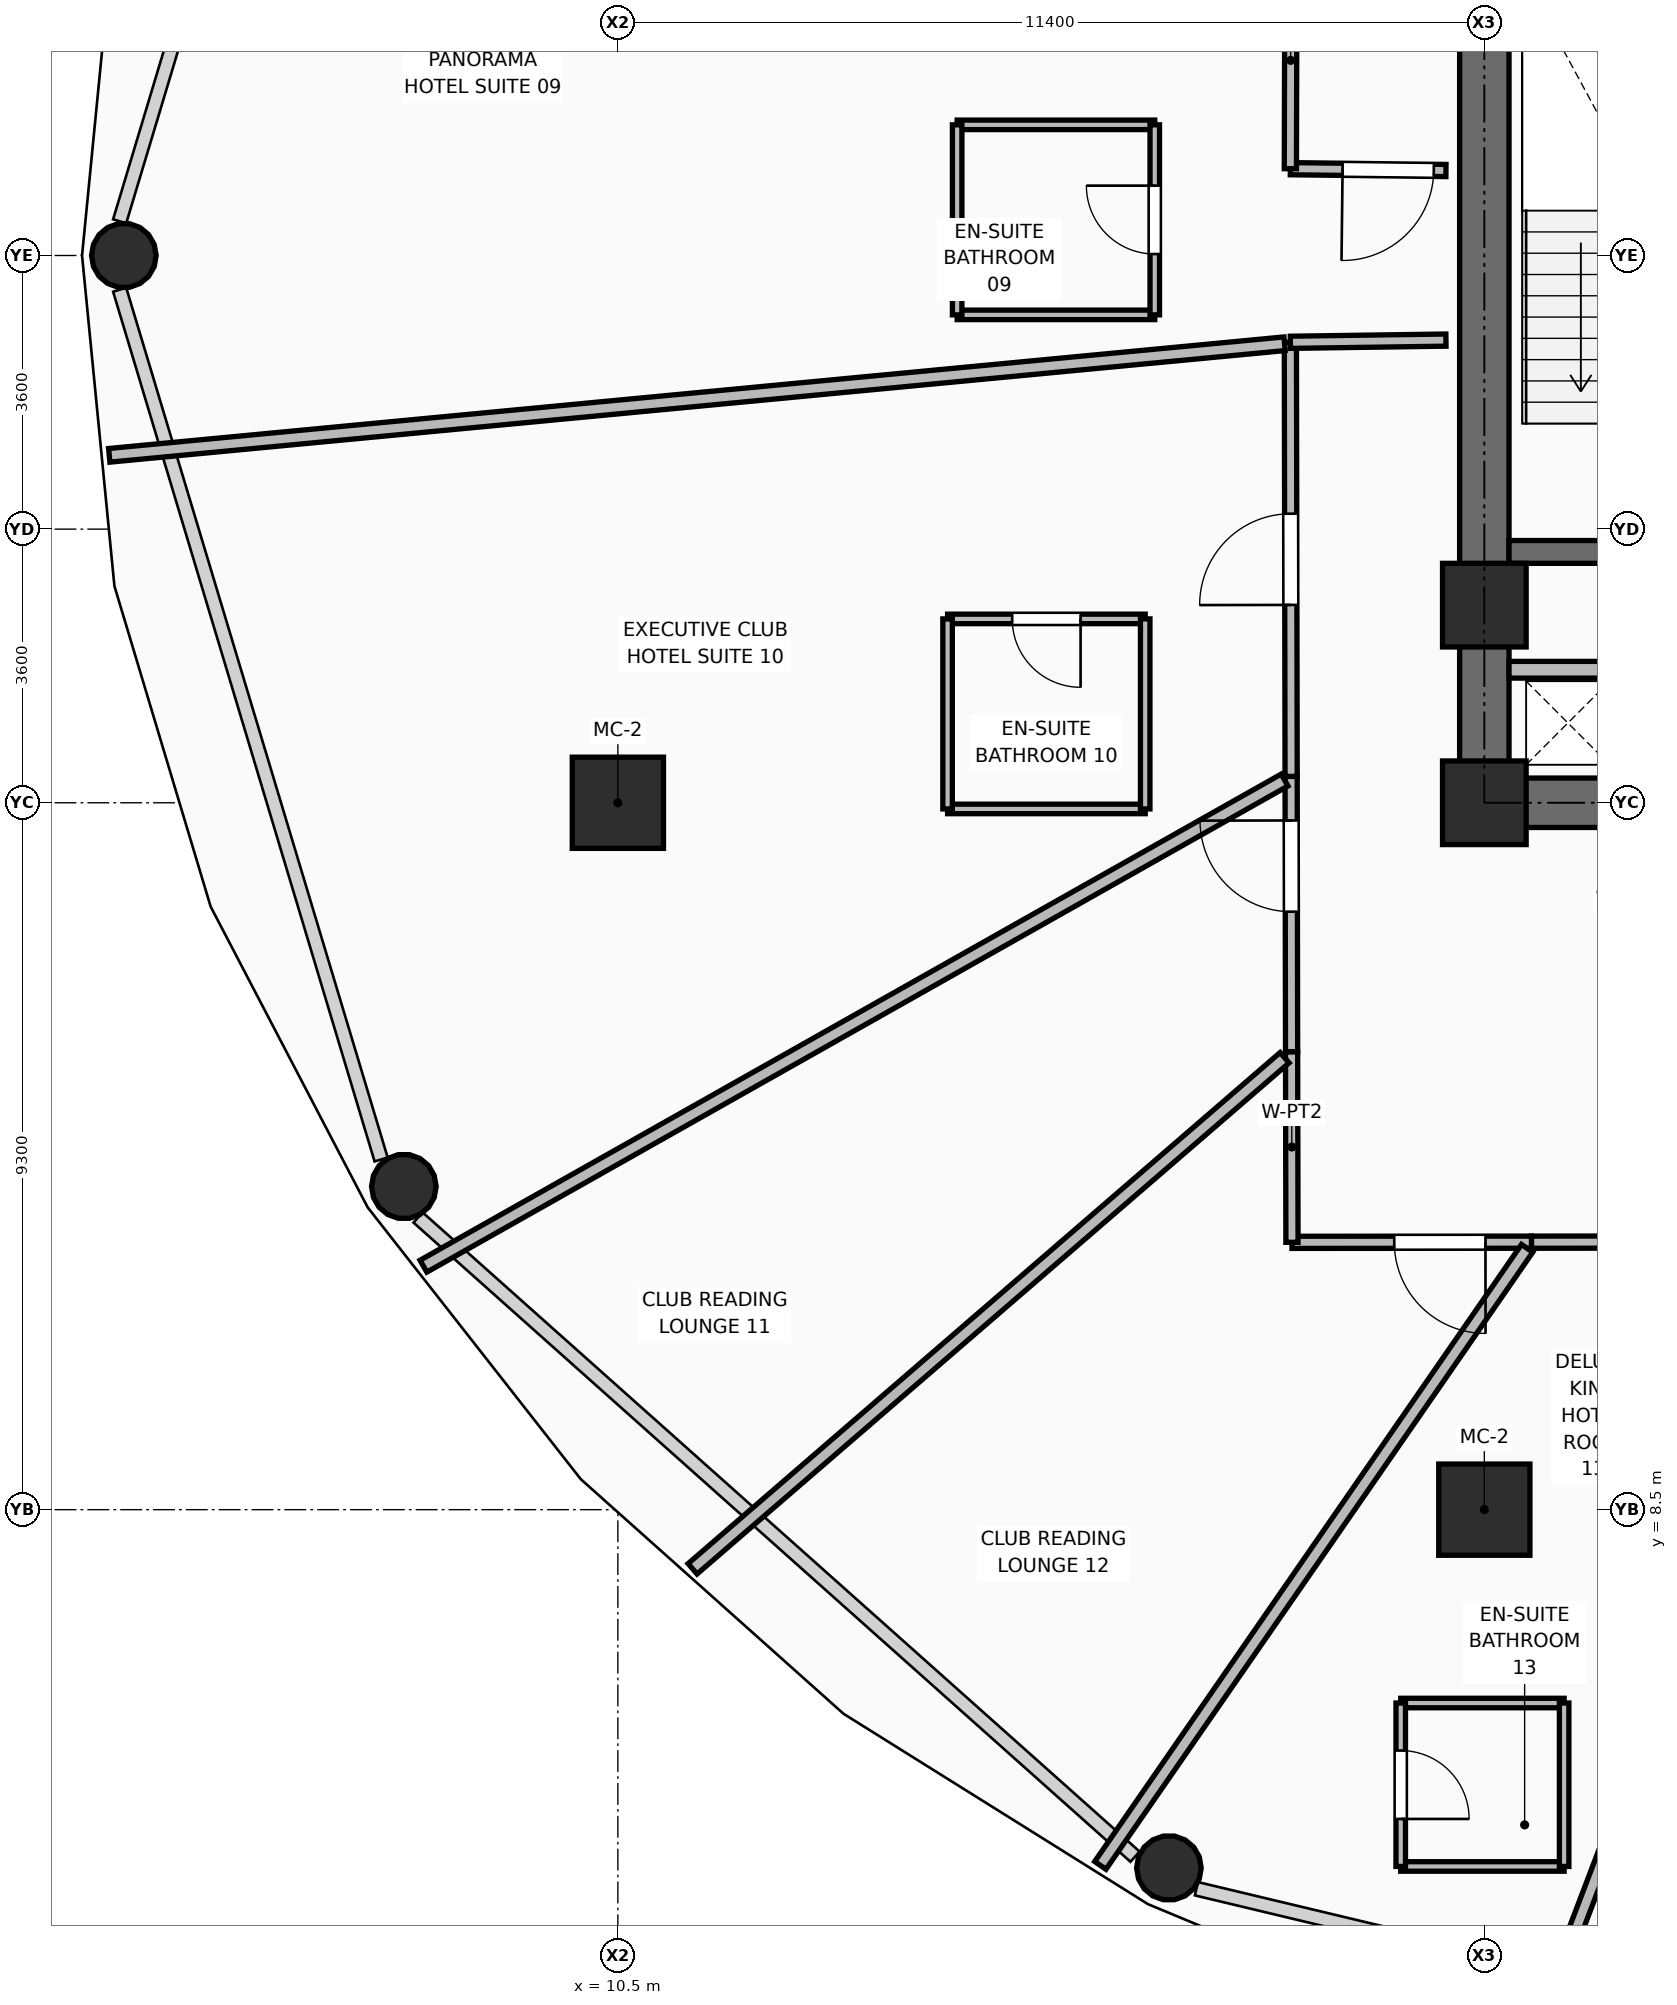
"""IFC4 building model, lengths in metres.
Left out: names, types, materials, properties, quantities, classifications, styles, units other than length and angle.
Written with IfcOpenShell. Run it as: python <this file> out.ifc"""

import sys

from ifc_helpers import new_model, si_unit, direction, frame, frame_2d, origin, origin_2d, place, context, subcontext, project, spatial, rectangle, hollow_rectangle, hollow_circle, extrude, element, fill, save


model = new_model("IFC4")
c1 = context("Model", 3, precision=1e-05, world=origin(), true_north=direction((0.0, 1.0)))
c2 = subcontext(c1, "Body", "Model", "MODEL_VIEW")
j1 = project(units=[si_unit("LENGTHUNIT", "METRE"), si_unit("PLANEANGLEUNIT", "RADIAN")], contexts=[c1])
p1 = place(None, origin())
s1 = spatial("IfcSite", under=j1, at=p1, CompositionType="ELEMENT")
p2 = place(p1, origin())
s2 = spatial("IfcBuilding", under=s1, at=p2, CompositionType="ELEMENT")
p3 = place(p2, frame((0.0, 0.0, 83.25)))
s3 = spatial("IfcBuildingStorey", under=s2, at=p3, CompositionType="ELEMENT", Elevation=83.25)
for number, where, z_axis, x_axis in (
    (1, (21.9, 17.8, 0.0), (0.0, 0.0, 1.0), (1.0, 0.0, 0.0)),
    (2, (21.9, 20.4, 0.0), (0.0, 0.0, 1.0), (1.0, 0.0, 0.0)),
):
    element("IfcColumn", number, at=place(p3, frame(where, z_axis=z_axis, x_axis=x_axis)), inside=s3, PredefinedType="COLUMN", context=c2, shape_type="SweptSolid", body=[
        extrude(rectangle(XDim=1.1, YDim=1.1, at=origin_2d()), origin(), (0.0, 0.0, 1.0), 3.75),
    ])
for number, where, z_axis, x_axis in (
    (3, (21.9, 8.5, 0.0), (0.0, 0.0, 1.0), (1.0, 0.0, 0.0)),
    (4, (10.5, 17.8, 0.0), (0.0, 0.0, 1.0), (1.0, 0.0, 0.0)),
):
    element("IfcColumn", number, at=place(p3, frame(where, z_axis=z_axis, x_axis=x_axis)), inside=s3, PredefinedType="COLUMN", context=c2, shape_type="SweptSolid", body=[
        extrude(hollow_rectangle(XDim=1.2, YDim=1.2, WallThickness=0.045, at=origin_2d()), origin(), (0.0, 0.0, 1.0), 3.75),
    ])
for number, where, z_axis, x_axis in (
    (5, (4.0, 25.0, 0.0), (0.0, 0.0, 1.0), (1.0, 0.0, 0.0)),
    (6, (7.684, 12.752, 0.0), (0.0, 0.0, 1.0), (1.0, 0.0, 0.0)),
    (7, (17.75, 3.787, 0.0), (0.0, 0.0, 1.0), (1.0, 0.0, 0.0)),
):
    element("IfcColumn", number, at=place(p3, frame(where, z_axis=z_axis, x_axis=x_axis)), inside=s3, PredefinedType="COLUMN", context=c2, shape_type="SweptSolid", body=[
        extrude(hollow_circle(Radius=0.425, WallThickness=0.04, at=origin_2d()), origin(), (0.0, 0.0, 1.0), 3.57),
    ])
p4 = place(p3, frame((21.575, 17.8, 0.0), z_axis=(0.0, 0.0, 1.0), x_axis=(1.0, 0.0, 0.0)))
e8 = element("IfcWall", 8, at=p4, inside=s3, PredefinedType="SHEAR", context=c2, shape_type="SweptSolid", body=[
    extrude(rectangle(XDim=2.175, YDim=0.65, at=frame_2d((1.087, 0.0))), origin(), (0.0, 0.0, 1.0), 3.57),
])
p5 = place(p3, frame((21.9, 18.125, 0.0), z_axis=(0.0, 0.0, 1.0), x_axis=(0.0, 1.0, 0.0)))
e9 = element("IfcWall", 9, at=p5, inside=s3, PredefinedType="SHEAR", context=c2, shape_type="SweptSolid", body=[
    extrude(rectangle(XDim=14.0, YDim=0.65, at=frame_2d((7.0, 0.0))), origin(), (0.0, 0.0, 1.0), 3.57),
])
p6 = place(p3, frame((22.225, 21.1, 0.0), z_axis=(0.0, 0.0, 1.0), x_axis=(1.0, 0.0, 0.0)))
e10 = element("IfcWall", 10, at=p6, inside=s3, PredefinedType="SHEAR", context=c2, shape_type="SweptSolid", body=[
    extrude(rectangle(XDim=3.515, YDim=0.3, at=frame_2d((1.757, 0.0))), origin(), (0.0, 0.0, 1.0), 3.57),
])
p7 = place(p6, frame((1.995, 0.0, 0.0)))
e11 = element("IfcOpeningElement", 11, at=p7, cuts=e10, PredefinedType="OPENING", context=c2, shape_type="SweptSolid", body=[
    extrude(rectangle(XDim=1.05, YDim=2.1, at=frame_2d((0.525, 1.05))), frame((0.0, 0.16, 0.0), z_axis=(0.0, -1.0, 0.0), x_axis=(1.0, 0.0, 0.0)), (0.0, 0.0, 1.0), 0.32),
])
p8 = place(p3, frame((22.225, 19.55, 0.0), z_axis=(0.0, 0.0, 1.0), x_axis=(1.0, 0.0, 0.0)))
e12 = element("IfcWall", 12, at=p8, inside=s3, PredefinedType="PARTITIONING", context=c2, shape_type="SweptSolid", body=[
    extrude(rectangle(XDim=1.565, YDim=0.22, at=frame_2d((0.782, 0.0))), origin(), (0.0, 0.0, 1.0), 2.595),
])
p9 = place(p3, frame((21.395, 26.118, 0.0), z_axis=(0.0, 0.0, 1.0), x_axis=(-0.999930307049, 0.011805975003, 0.0)))
e13 = element("IfcWall", 13, at=p9, inside=s3, PredefinedType="PARTITIONING", context=c2, shape_type="SweptSolid", body=[
    extrude(rectangle(XDim=2.047, YDim=0.16, at=frame_2d((1.024, 0.0))), origin(), (0.0, 0.0, 1.0), 3.55),
])
p10 = place(p9, frame((0.16, 0.0, 0.0)))
e14 = element("IfcOpeningElement", 14, at=p10, cuts=e13, PredefinedType="OPENING", context=c2, shape_type="SweptSolid", body=[
    extrude(rectangle(XDim=1.2, YDim=2.1, at=frame_2d((0.6, 1.05))), frame((0.0, 0.09, 0.0), z_axis=(0.0, -1.0, 0.0), x_axis=(1.0, 0.0, 0.0)), (0.0, 0.0, 1.0), 0.18),
])
p11 = place(p3, frame((19.348, 26.142, 0.0), z_axis=(0.0, 0.0, 1.0), x_axis=(0.002483506942, 0.999996916092, 0.0)))
e15 = element("IfcWall", 15, at=p11, inside=s3, PredefinedType="PARTITIONING", context=c2, shape_type="SweptSolid", body=[
    extrude(rectangle(XDim=2.851, YDim=0.16, at=frame_2d((1.425, 0.0))), origin(), (0.0, 0.0, 1.0), 3.55),
])
p12 = place(p3, frame((26.552, 12.022, 0.0), z_axis=(0.0, 0.0, 1.0), x_axis=(-0.999999736017, -0.000726611979, 0.0)))
e16 = element("IfcWall", 16, at=p12, inside=s3, PredefinedType="PARTITIONING", context=c2, shape_type="SweptSolid", body=[
    extrude(rectangle(XDim=4.032, YDim=0.16, at=frame_2d((2.016, 0.0))), origin(), (0.0, 0.0, 1.0), 3.55),
])
p13 = place(p12, frame((1.587, 0.0, 0.0)))
e17 = element("IfcOpeningElement", 17, at=p13, cuts=e16, PredefinedType="OPENING", context=c2, shape_type="SweptSolid", body=[
    extrude(rectangle(XDim=1.0, YDim=2.1, at=frame_2d((0.5, 1.05))), frame((0.0, 0.09, 0.0), z_axis=(0.0, -1.0, 0.0), x_axis=(1.0, 0.0, 0.0)), (0.0, 0.0, 1.0), 0.18),
])
p14 = place(p3, frame((22.52, 12.019, 0.0), z_axis=(0.0, 0.0, 1.0), x_axis=(-0.999999807912, -0.000619818584, 0.0)))
e18 = element("IfcWall", 18, at=p14, inside=s3, PredefinedType="PARTITIONING", context=c2, shape_type="SweptSolid", body=[
    extrude(rectangle(XDim=3.151, YDim=0.16, at=frame_2d((1.576, 0.0))), origin(), (0.0, 0.0, 1.0), 2.928),
])
p15 = place(p14, frame((0.605, 0.0, 0.0)))
e19 = element("IfcOpeningElement", 19, at=p15, cuts=e18, PredefinedType="OPENING", context=c2, shape_type="SweptSolid", body=[
    extrude(rectangle(XDim=1.2, YDim=2.1, at=frame_2d((0.6, 1.05))), frame((0.0, 0.09, 0.0), z_axis=(0.0, -1.0, 0.0), x_axis=(1.0, 0.0, 0.0)), (0.0, 0.0, 1.0), 0.18),
])
p16 = place(p3, frame((19.369, 12.017, 0.0), z_axis=(0.0, 0.0, 1.0), x_axis=(-0.001947036808, 0.999998104522, 0.0)))
e20 = element("IfcWall", 20, at=p16, inside=s3, PredefinedType="PARTITIONING", context=c2, shape_type="SweptSolid", body=[
    extrude(rectangle(XDim=2.508, YDim=0.16, at=frame_2d((1.254, 0.0))), origin(), (0.0, 0.0, 1.0), 3.55),
])
p17 = place(p3, frame((19.364, 14.525, 0.0), z_axis=(0.0, 0.0, 1.0), x_axis=(-0.001685087928, 0.999998580238, 0.0)))
e21 = element("IfcWall", 21, at=p17, inside=s3, PredefinedType="PARTITIONING", context=c2, shape_type="SweptSolid", body=[
    extrude(rectangle(XDim=3.622, YDim=0.16, at=frame_2d((1.811, 0.0))), origin(), (0.0, 0.0, 1.0), 2.928),
])
p18 = place(p17, frame((1.842, 0.0, 0.0)))
e22 = element("IfcOpeningElement", 22, at=p18, cuts=e21, PredefinedType="OPENING", context=c2, shape_type="SweptSolid", body=[
    extrude(rectangle(XDim=1.2, YDim=2.1, at=frame_2d((0.6, 1.05))), frame((0.0, 0.09, 0.0), z_axis=(0.0, -1.0, 0.0), x_axis=(1.0, 0.0, 0.0)), (0.0, 0.0, 1.0), 0.18),
])
p19 = place(p3, frame((19.358, 18.147, 0.0), z_axis=(0.0, 0.0, 1.0), x_axis=(-0.001752733286, 0.999998463962, 0.0)))
e23 = element("IfcWall", 23, at=p19, inside=s3, PredefinedType="PARTITIONING", context=c2, shape_type="SweptSolid", body=[
    extrude(rectangle(XDim=5.711, YDim=0.16, at=frame_2d((2.855, 0.0))), origin(), (0.0, 0.0, 1.0), 2.928),
])
p20 = place(p19, frame((2.256, 0.0, 0.0)))
e24 = element("IfcOpeningElement", 24, at=p20, cuts=e23, PredefinedType="OPENING", context=c2, shape_type="SweptSolid", body=[
    extrude(rectangle(XDim=1.2, YDim=2.1, at=frame_2d((0.6, 1.05))), frame((0.0, 0.09, 0.0), z_axis=(0.0, -1.0, 0.0), x_axis=(1.0, 0.0, 0.0)), (0.0, 0.0, 1.0), 0.18),
])
p21 = place(p3, frame((19.348, 23.858, 0.0), z_axis=(0.0, 0.0, 1.0), x_axis=(0.999899308643, 0.014190580528, 0.0)))
e25 = element("IfcWall", 25, at=p21, inside=s3, PredefinedType="PARTITIONING", context=c2, shape_type="SweptSolid", body=[
    extrude(rectangle(XDim=2.047, YDim=0.16, at=frame_2d((1.024, 0.0))), origin(), (0.0, 0.0, 1.0), 3.55),
])
p22 = place(p3, frame((19.272, 23.839, 0.0), z_axis=(0.0, 0.0, 1.0), x_axis=(-0.995524176843, -0.094507213062, 0.0)))
e26 = element("IfcWall", 26, at=p22, inside=s3, PredefinedType="PARTITIONING", context=c2, shape_type="SweptSolid", body=[
    extrude(rectangle(XDim=15.533, YDim=0.18, at=frame_2d((7.767, 0.0))), origin(), (0.0, 0.0, 1.0), 2.775),
])
p23 = place(p3, frame((19.272, 18.099, 0.0), z_axis=(0.0, 0.0, 1.0), x_axis=(-0.870816794363, -0.491607679614, 0.0)))
e27 = element("IfcWall", 27, at=p23, inside=s3, PredefinedType="PARTITIONING", context=c2, shape_type="SweptSolid", body=[
    extrude(rectangle(XDim=13.011, YDim=0.18, at=frame_2d((6.505, 0.0))), origin(), (0.0, 0.0, 1.0), 2.775),
])
p24 = place(p3, frame((19.272, 14.446, 0.0), z_axis=(0.0, 0.0, 1.0), x_axis=(-0.756957430289, -0.653464190855, 0.0)))
e28 = element("IfcWall", 28, at=p24, inside=s3, PredefinedType="PARTITIONING", context=c2, shape_type="SweptSolid", body=[
    extrude(rectangle(XDim=10.29, YDim=0.18, at=frame_2d((5.145, 0.0))), origin(), (0.0, 0.0, 1.0), 2.775),
])
p25 = place(p3, frame((22.463, 11.938, 0.0), z_axis=(0.0, 0.0, 1.0), x_axis=(-0.568860087872, -0.822434313746, 0.0)))
e29 = element("IfcWall", 29, at=p25, inside=s3, PredefinedType="PARTITIONING", context=c2, shape_type="SweptSolid", body=[
    extrude(rectangle(XDim=9.871, YDim=0.18, at=frame_2d((4.935, 0.0))), origin(), (0.0, 0.0, 1.0), 2.775),
])
p26 = place(p3, frame((26.52, 11.938, 0.0), z_axis=(0.0, 0.0, 1.0), x_axis=(-0.356180272112, -0.934417258915, 0.0)))
e30 = element("IfcWall", 30, at=p26, inside=s3, PredefinedType="PARTITIONING", context=c2, shape_type="SweptSolid", body=[
    extrude(rectangle(XDim=11.253, YDim=0.18, at=frame_2d((5.626, 0.0))), origin(), (0.0, 0.0, 1.0), 2.775),
])
for number, where, z_axis, x_axis in (
    (31, (14.964, 24.219, 0.0), (0.0, 0.0, 1.0), (1.0, 0.0, 0.0)),
    (32, (14.964, 26.719, 0.0), (0.0, 0.0, 1.0), (1.0, 0.0, 0.0)),
):
    element("IfcWall", number, at=place(p3, frame(where, z_axis=z_axis, x_axis=x_axis)), inside=s3, PredefinedType="PARTITIONING", context=c2, shape_type="SweptSolid", body=[
        extrude(rectangle(XDim=2.6, YDim=0.125, at=frame_2d((1.3, 0.0))), origin(), (0.0, 0.0, 1.0), 3.55),
    ])
p27 = place(p3, frame((14.964, 24.219, 0.0), z_axis=(0.0, 0.0, 1.0), x_axis=(0.0, 1.0, 0.0)))
e33 = element("IfcWall", 33, at=p27, inside=s3, PredefinedType="PARTITIONING", context=c2, shape_type="SweptSolid", body=[
    extrude(rectangle(XDim=2.5, YDim=0.125, at=frame_2d((1.25, 0.0))), origin(), (0.0, 0.0, 1.0), 3.55),
])
p28 = place(p3, frame((17.564, 24.219, 0.0), z_axis=(0.0, 0.0, 1.0), x_axis=(0.0, 1.0, 0.0)))
e34 = element("IfcWall", 34, at=p28, inside=s3, PredefinedType="PARTITIONING", context=c2, shape_type="SweptSolid", body=[
    extrude(rectangle(XDim=2.5, YDim=0.125, at=frame_2d((1.25, 0.0))), origin(), (0.0, 0.0, 1.0), 3.55),
])
p29 = place(p28, frame((0.8, 0.0, 0.0)))
e35 = element("IfcOpeningElement", 35, at=p29, cuts=e34, PredefinedType="OPENING", context=c2, shape_type="SweptSolid", body=[
    extrude(rectangle(XDim=0.9, YDim=2.1, at=frame_2d((0.45, 1.05))), frame((0.0, 0.073, 0.0), z_axis=(0.0, -1.0, 0.0), x_axis=(1.0, 0.0, 0.0)), (0.0, 0.0, 1.0), 0.145),
])
p30 = place(p3, frame((14.838, 17.719, 0.0), z_axis=(0.0, 0.0, 1.0), x_axis=(1.0, 0.0, 0.0)))
e36 = element("IfcWall", 36, at=p30, inside=s3, PredefinedType="PARTITIONING", context=c2, shape_type="SweptSolid", body=[
    extrude(rectangle(XDim=2.6, YDim=0.125, at=frame_2d((1.3, 0.0))), origin(), (0.0, 0.0, 1.0), 3.55),
])
p31 = place(p3, frame((14.838, 20.219, 0.0), z_axis=(0.0, 0.0, 1.0), x_axis=(1.0, 0.0, 0.0)))
e37 = element("IfcWall", 37, at=p31, inside=s3, PredefinedType="PARTITIONING", context=c2, shape_type="SweptSolid", body=[
    extrude(rectangle(XDim=2.6, YDim=0.125, at=frame_2d((1.3, 0.0))), origin(), (0.0, 0.0, 1.0), 3.55),
])
p32 = place(p31, frame((0.85, 0.0, 0.0)))
e38 = element("IfcOpeningElement", 38, at=p32, cuts=e37, PredefinedType="OPENING", context=c2, shape_type="SweptSolid", body=[
    extrude(rectangle(XDim=0.9, YDim=2.1, at=frame_2d((0.45, 1.05))), frame((0.0, 0.073, 0.0), z_axis=(0.0, -1.0, 0.0), x_axis=(1.0, 0.0, 0.0)), (0.0, 0.0, 1.0), 0.145),
])
for number, where, z_axis, x_axis in (
    (39, (14.838, 17.719, 0.0), (0.0, 0.0, 1.0), (0.0, 1.0, 0.0)),
    (40, (17.438, 17.719, 0.0), (0.0, 0.0, 1.0), (0.0, 1.0, 0.0)),
):
    element("IfcWall", number, at=place(p3, frame(where, z_axis=z_axis, x_axis=x_axis)), inside=s3, PredefinedType="PARTITIONING", context=c2, shape_type="SweptSolid", body=[
        extrude(rectangle(XDim=2.5, YDim=0.125, at=frame_2d((1.25, 0.0))), origin(), (0.0, 0.0, 1.0), 3.55),
    ])
for number, where, z_axis, x_axis in (
    (41, (20.8, 3.806, 0.0), (0.0, 0.0, 1.0), (1.0, 0.0, 0.0)),
    (42, (20.8, 5.956, 0.0), (0.0, 0.0, 1.0), (1.0, 0.0, 0.0)),
):
    element("IfcWall", number, at=place(p3, frame(where, z_axis=z_axis, x_axis=x_axis)), inside=s3, PredefinedType="PARTITIONING", context=c2, shape_type="SweptSolid", body=[
        extrude(rectangle(XDim=2.15, YDim=0.125, at=frame_2d((1.075, 0.0))), origin(), (0.0, 0.0, 1.0), 3.55),
    ])
p33 = place(p3, frame((20.8, 3.806, 0.0), z_axis=(0.0, 0.0, 1.0), x_axis=(0.0, 1.0, 0.0)))
e43 = element("IfcWall", 43, at=p33, inside=s3, PredefinedType="PARTITIONING", context=c2, shape_type="SweptSolid", body=[
    extrude(rectangle(XDim=2.15, YDim=0.125, at=frame_2d((1.075, 0.0))), origin(), (0.0, 0.0, 1.0), 3.55),
])
p34 = place(p33, frame((0.625, 0.0, 0.0)))
e44 = element("IfcOpeningElement", 44, at=p34, cuts=e43, PredefinedType="OPENING", context=c2, shape_type="SweptSolid", body=[
    extrude(rectangle(XDim=0.9, YDim=2.1, at=frame_2d((0.45, 1.05))), frame((0.0, 0.073, 0.0), z_axis=(0.0, -1.0, 0.0), x_axis=(1.0, 0.0, 0.0)), (0.0, 0.0, 1.0), 0.145),
])
p35 = place(p3, frame((22.95, 3.806, 0.0), z_axis=(0.0, 0.0, 1.0), x_axis=(0.0, 1.0, 0.0)))
e45 = element("IfcWall", 45, at=p35, inside=s3, PredefinedType="PARTITIONING", context=c2, shape_type="SweptSolid", body=[
    extrude(rectangle(XDim=2.15, YDim=0.125, at=frame_2d((1.075, 0.0))), origin(), (0.0, 0.0, 1.0), 3.55),
])
p36 = place(p29, origin())
e46 = element("IfcDoor", 46, at=p36, inside=s3, OperationType="SINGLE_SWING_RIGHT", PredefinedType="DOOR", context=c2, shape_type="SweptSolid", body=[
    extrude(rectangle(XDim=0.9, YDim=2.1, at=frame_2d((0.45, 1.05))), frame((0.0, 0.025, 0.0), z_axis=(0.0, -1.0, 0.0), x_axis=(1.0, 0.0, 0.0)), (0.0, 0.0, 1.0), 0.05),
])
fill(e35, e46)
p37 = place(p10, origin())
e47 = element("IfcDoor", 47, at=p37, inside=s3, OperationType="SINGLE_SWING_RIGHT", PredefinedType="DOOR", context=c2, shape_type="SweptSolid", body=[
    extrude(rectangle(XDim=1.2, YDim=2.1, at=frame_2d((0.6, 1.05))), frame((0.0, 0.025, 0.0), z_axis=(0.0, -1.0, 0.0), x_axis=(1.0, 0.0, 0.0)), (0.0, 0.0, 1.0), 0.05),
])
fill(e14, e47)
p38 = place(p32, frame((0.9, 0.0, 0.0), z_axis=(0.0, 0.0, 1.0), x_axis=(-1.0, 0.0, 0.0)))
e48 = element("IfcDoor", 48, at=p38, inside=s3, OperationType="SINGLE_SWING_LEFT", PredefinedType="DOOR", context=c2, shape_type="SweptSolid", body=[
    extrude(rectangle(XDim=0.9, YDim=2.1, at=frame_2d((0.45, 1.05))), frame((0.0, 0.025, 0.0), z_axis=(0.0, -1.0, 0.0), x_axis=(1.0, 0.0, 0.0)), (0.0, 0.0, 1.0), 0.05),
])
fill(e38, e48)
p39 = place(p20, origin())
e49 = element("IfcDoor", 49, at=p39, inside=s3, OperationType="SINGLE_SWING_LEFT", PredefinedType="DOOR", context=c2, shape_type="SweptSolid", body=[
    extrude(rectangle(XDim=1.2, YDim=2.1, at=frame_2d((0.6, 1.05))), frame((0.0, 0.025, 0.0), z_axis=(0.0, -1.0, 0.0), x_axis=(1.0, 0.0, 0.0)), (0.0, 0.0, 1.0), 0.05),
])
fill(e24, e49)
p40 = place(p18, origin())
e50 = element("IfcDoor", 50, at=p40, inside=s3, OperationType="SINGLE_SWING_RIGHT", PredefinedType="DOOR", context=c2, shape_type="SweptSolid", body=[
    extrude(rectangle(XDim=1.2, YDim=2.1, at=frame_2d((0.6, 1.05))), frame((0.0, 0.025, 0.0), z_axis=(0.0, -1.0, 0.0), x_axis=(1.0, 0.0, 0.0)), (0.0, 0.0, 1.0), 0.05),
])
fill(e22, e50)
p41 = place(p15, origin())
e51 = element("IfcDoor", 51, at=p41, inside=s3, OperationType="SINGLE_SWING_LEFT", PredefinedType="DOOR", context=c2, shape_type="SweptSolid", body=[
    extrude(rectangle(XDim=1.2, YDim=2.1, at=frame_2d((0.6, 1.05))), frame((0.0, 0.025, 0.0), z_axis=(0.0, -1.0, 0.0), x_axis=(1.0, 0.0, 0.0)), (0.0, 0.0, 1.0), 0.05),
])
fill(e19, e51)
p42 = place(p34, frame((0.9, 0.0, 0.0), z_axis=(0.0, 0.0, 1.0), x_axis=(-1.0, 0.0, 0.0)))
e52 = element("IfcDoor", 52, at=p42, inside=s3, OperationType="SINGLE_SWING_RIGHT", PredefinedType="DOOR", context=c2, shape_type="SweptSolid", body=[
    extrude(rectangle(XDim=0.9, YDim=2.1, at=frame_2d((0.45, 1.05))), frame((0.0, 0.025, 0.0), z_axis=(0.0, -1.0, 0.0), x_axis=(1.0, 0.0, 0.0)), (0.0, 0.0, 1.0), 0.05),
])
fill(e44, e52)
save(model, sys.argv[1])
